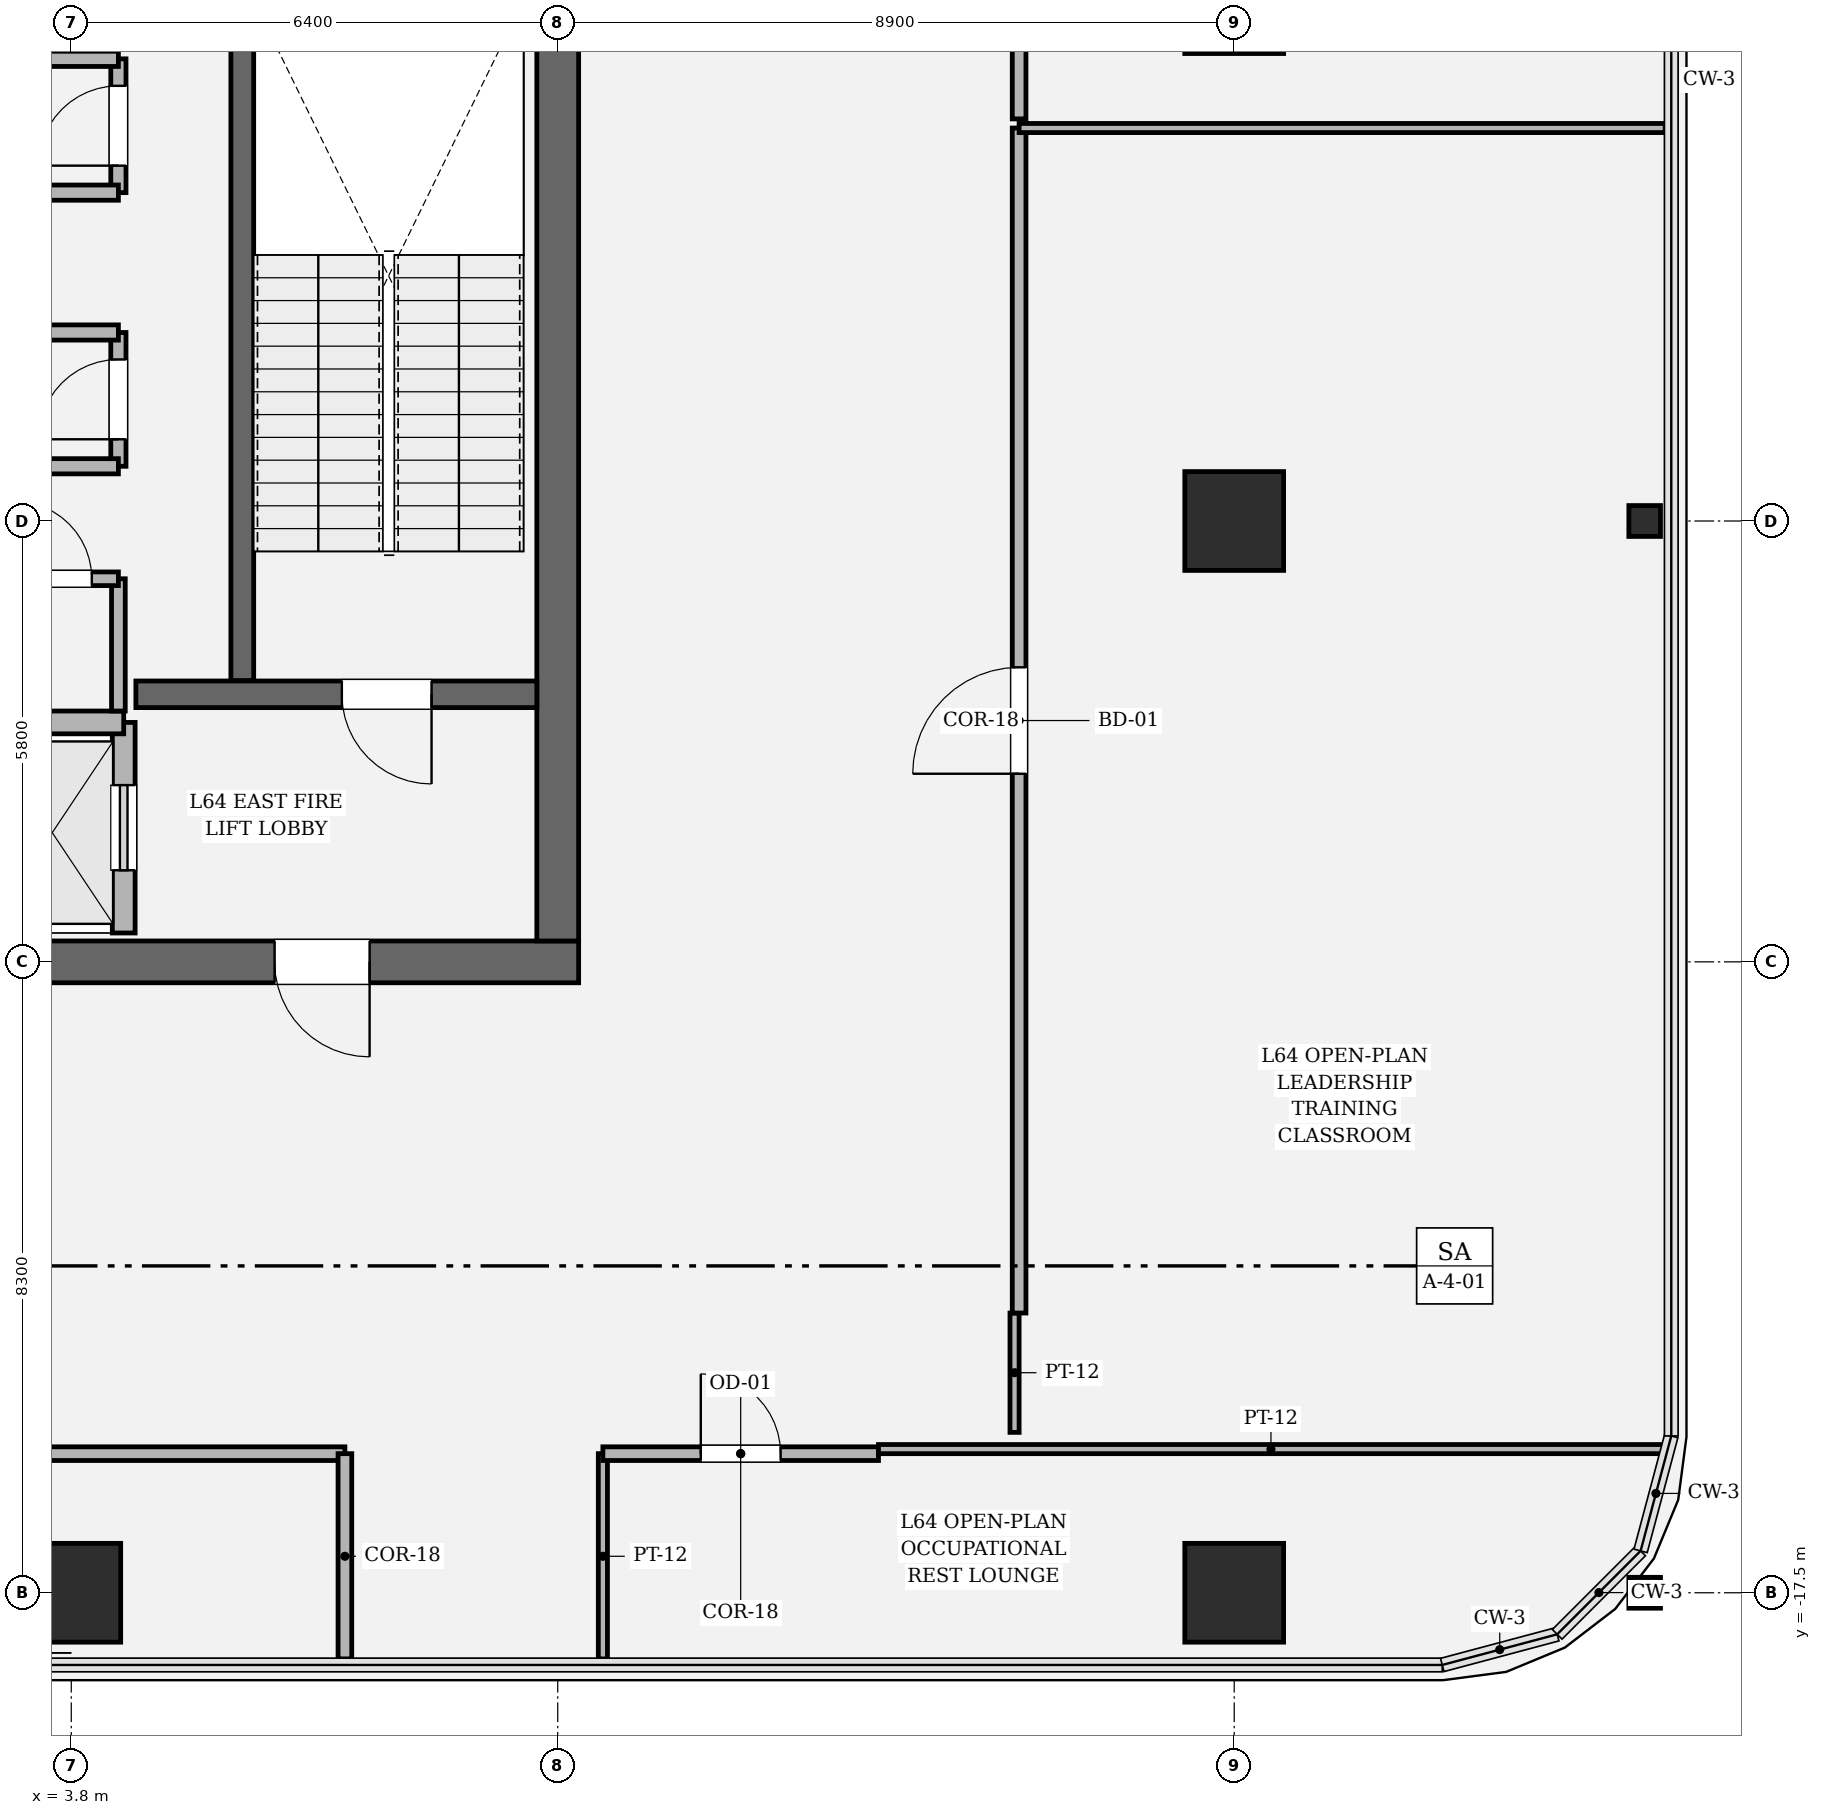
"""IFC4 building model, lengths in metres.
Left out: names, types, materials, properties, quantities, classifications, styles, units other than length and angle.
Written with IfcOpenShell. Run it as: python <this file> out.ifc"""

import sys

from ifc_helpers import new_model, si_unit, direction, frame, frame_2d, origin, origin_2d, place, context, subcontext, project, spatial, rectangle, hollow_rectangle, i_section, extrude, element, fill, save


model = new_model("IFC4")
c1 = context("Model", 3, precision=1e-05, world=origin(), true_north=direction((0.0, 1.0)))
c2 = subcontext(c1, "Body", "Model", "MODEL_VIEW")
j1 = project(units=[si_unit("LENGTHUNIT", "METRE"), si_unit("PLANEANGLEUNIT", "RADIAN")], contexts=[c1])
p1 = place(None, origin())
s1 = spatial("IfcSite", under=j1, at=p1, CompositionType="ELEMENT")
p2 = place(p1, origin())
s2 = spatial("IfcBuilding", under=s1, at=p2, CompositionType="ELEMENT")
p3 = place(p2, frame((0.0, 0.0, 271.65)))
s3 = spatial("IfcBuildingStorey", under=s2, at=p3, CompositionType="ELEMENT", Elevation=271.65)
p4 = place(p3, frame((10.475, -9.2, 0.0), z_axis=(0.0, 0.0, 1.0), x_axis=(-1.0, 0.0, 0.0)))
e1 = element("IfcWall", 1, at=p4, inside=s3, PredefinedType="SHEAR", context=c2, shape_type="SweptSolid", body=[
    extrude(rectangle(XDim=20.95, YDim=0.55, at=frame_2d((10.475, 0.0))), origin(), (0.0, 0.0, 1.0), 4.05),
])
p5 = place(p4, frame((2.75, 0.0, 0.0)))
e2 = element("IfcOpeningElement", 2, at=p5, cuts=e1, PredefinedType="OPENING", context=c2, shape_type="SweptSolid", body=[
    extrude(rectangle(XDim=1.25, YDim=2.25, at=frame_2d((0.625, 1.125))), frame((0.0, 0.285, 0.0), z_axis=(0.0, -1.0, 0.0), x_axis=(1.0, 0.0, 0.0)), (0.0, 0.0, 1.0), 0.57),
])
p6 = place(p4, frame((16.95, 0.0, 0.0)))
e3 = element("IfcOpeningElement", 3, at=p6, cuts=e1, PredefinedType="OPENING", context=c2, shape_type="SweptSolid", body=[
    extrude(rectangle(XDim=1.25, YDim=2.25, at=frame_2d((0.625, 1.125))), frame((0.0, 0.285, 0.0), z_axis=(0.0, -1.0, 0.0), x_axis=(1.0, 0.0, 0.0)), (0.0, 0.0, 1.0), 0.57),
])
p7 = place(p3, frame((10.2, 8.925, 0.0), z_axis=(0.0, 0.0, 1.0), x_axis=(0.0, -1.0, 0.0)))
e4 = element("IfcWall", 4, at=p7, inside=s3, PredefinedType="SHEAR", context=c2, shape_type="SweptSolid", body=[
    extrude(rectangle(XDim=17.85, YDim=0.55, at=frame_2d((8.925, 0.0))), origin(), (0.0, 0.0, 1.0), 4.05),
])
p8 = place(p7, frame((3.955, 0.0, 0.0)))
e5 = element("IfcOpeningElement", 5, at=p8, cuts=e4, PredefinedType="OPENING", context=c2, shape_type="SweptSolid", body=[
    extrude(rectangle(XDim=1.18, YDim=2.2, at=frame_2d((0.59, 1.1))), frame((0.0, 0.285, 0.0), z_axis=(0.0, -1.0, 0.0), x_axis=(1.0, 0.0, 0.0)), (0.0, 0.0, 1.0), 0.57),
])
p9 = place(p3, frame((6.05, 3.45, 0.0), z_axis=(0.0, 0.0, 1.0), x_axis=(0.0, -1.0, 0.0)))
e6 = element("IfcWall", 6, at=p9, inside=s3, PredefinedType="SOLIDWALL", context=c2, shape_type="SweptSolid", body=[
    extrude(rectangle(XDim=8.95, YDim=0.3, at=frame_2d((4.475, 0.0))), origin(), (0.0, 0.0, 1.0), 4.05),
])
p10 = place(p3, frame((4.65, -5.68, 0.0), z_axis=(0.0, 0.0, 1.0), x_axis=(1.0, 0.0, 0.0)))
e7 = element("IfcWall", 7, at=p10, inside=s3, PredefinedType="SOLIDWALL", context=c2, shape_type="SweptSolid", body=[
    extrude(rectangle(XDim=5.275, YDim=0.35, at=frame_2d((2.638, 0.0))), origin(), (0.0, 0.0, 1.0), 4.05),
])
p11 = place(p10, frame((2.71, 0.0, 0.0)))
e8 = element("IfcOpeningElement", 8, at=p11, cuts=e7, PredefinedType="OPENING", context=c2, shape_type="SweptSolid", body=[
    extrude(rectangle(XDim=1.18, YDim=2.2, at=frame_2d((0.59, 1.1))), frame((0.0, 0.185, 0.0), z_axis=(0.0, -1.0, 0.0), x_axis=(1.0, 0.0, 0.0)), (0.0, 0.0, 1.0), 0.37),
])
for number, where, z_axis, x_axis in (
    (9, (3.8, -17.5, 0.0), (0.0, 0.0, 1.0), (1.0, 0.0, 0.0)),
    (10, (19.1, -17.5, 0.0), (0.0, 0.0, 1.0), (1.0, 0.0, 0.0)),
    (11, (19.1, -3.4, 0.0), (0.0, 0.0, 1.0), (1.0, 0.0, 0.0)),
    (12, (19.1, 3.4, 0.0), (0.0, 0.0, 1.0), (1.0, 0.0, 0.0)),
):
    element("IfcColumn", number, at=place(p3, frame(where, z_axis=z_axis, x_axis=x_axis)), inside=s3, PredefinedType="COLUMN", context=c2, shape_type="SweptSolid", body=[
        extrude(hollow_rectangle(XDim=1.3, YDim=1.3, WallThickness=0.038, at=origin_2d()), origin(), (0.0, 0.0, 1.0), 4.05),
    ])
for number, where, z_axis, x_axis in (
    (13, (24.5, -17.5, 0.0), (0.0, 0.0, 1.0), (0.0, 1.0, 0.0)),
    (14, (24.5, -3.4, 0.0), (0.0, 0.0, 1.0), (0.0, 1.0, 0.0)),
):
    element("IfcColumn", number, at=place(p3, frame(where, z_axis=z_axis, x_axis=x_axis)), inside=s3, PredefinedType="COLUMN", context=c2, shape_type="SweptSolid", body=[
        extrude(i_section(OverallWidth=0.406, OverallDepth=0.416, WebThickness=0.029, FlangeThickness=0.048, FilletRadius=0.018, at=origin_2d()), origin(), (0.0, 0.0, 1.0), 4.048),
    ])
p12 = place(p3, frame((4.49, -8.82, 0.0), z_axis=(0.0, 0.0, 1.0), x_axis=(0.0, 1.0, 0.0)))
e15 = element("IfcWall", 15, at=p12, inside=s3, PredefinedType="SOLIDWALL", context=c2, shape_type="SweptSolid", body=[
    extrude(rectangle(XDim=2.77, YDim=0.3, at=frame_2d((1.385, 0.0))), origin(), (0.0, 0.0, 1.0), 3.85),
])
p13 = place(p12, frame((0.825, 0.0, 0.0)))
e16 = element("IfcOpeningElement", 16, at=p13, cuts=e15, PredefinedType="OPENING", context=c2, shape_type="SweptSolid", body=[
    extrude(rectangle(XDim=1.12, YDim=2.25, at=frame_2d((0.56, 1.125))), frame((0.0, 0.16, 0.0), z_axis=(0.0, -1.0, 0.0), x_axis=(1.0, 0.0, 0.0)), (0.0, 0.0, 1.0), 0.32),
])
p14 = place(p3, frame((2.61, -6.05, 0.0), z_axis=(0.0, 0.0, 1.0), x_axis=(1.0, 0.0, 0.0)))
e17 = element("IfcWall", 17, at=p14, inside=s3, PredefinedType="SOLIDWALL", context=c2, shape_type="SweptSolid", body=[
    extrude(rectangle(XDim=1.88, YDim=0.3, at=frame_2d((0.94, 0.0))), origin(), (0.0, 0.0, 1.0), 3.85),
])
p15 = place(p3, frame((4.42, -5.9, 0.0), z_axis=(0.0, 0.0, 1.0), x_axis=(0.0, 1.0, 0.0)))
e18 = element("IfcWall", 18, at=p15, inside=s3, PredefinedType="PARTITIONING", context=c2, shape_type="SweptSolid", body=[
    extrude(rectangle(XDim=1.74, YDim=0.18, at=frame_2d((0.87, 0.0))), origin(), (0.0, 0.0, 1.0), 3.85),
])
p16 = place(p3, frame((4.42, -4.16, 0.0), z_axis=(0.0, 0.0, 1.0), x_axis=(-1.0, 0.0, 0.0)))
e19 = element("IfcWall", 19, at=p16, inside=s3, PredefinedType="PARTITIONING", context=c2, shape_type="SweptSolid", body=[
    extrude(rectangle(XDim=1.72, YDim=0.18, at=frame_2d((0.86, 0.0))), origin(), (0.0, 0.0, 1.0), 3.85),
])
p17 = place(p16, frame((0.35, 0.0, 0.0)))
e20 = element("IfcOpeningElement", 20, at=p17, cuts=e19, PredefinedType="OPENING", context=c2, shape_type="SweptSolid", body=[
    extrude(rectangle(XDim=1.02, YDim=2.2, at=frame_2d((0.51, 1.1))), frame((0.0, 0.1, 0.0), z_axis=(0.0, -1.0, 0.0), x_axis=(1.0, 0.0, 0.0)), (0.0, 0.0, 1.0), 0.2),
])
p18 = place(p3, frame((4.42, -2.68, 0.0), z_axis=(0.0, 0.0, 1.0), x_axis=(0.0, 1.0, 0.0)))
e21 = element("IfcWall", 21, at=p18, inside=s3, PredefinedType="SOLIDWALL", context=c2, shape_type="SweptSolid", body=[
    extrude(rectangle(XDim=1.76, YDim=0.2, at=frame_2d((0.88, 0.0))), origin(), (0.0, 0.0, 1.0), 3.85),
])
p19 = place(p18, frame((0.355, 0.0, 0.0)))
e22 = element("IfcOpeningElement", 22, at=p19, cuts=e21, PredefinedType="OPENING", context=c2, shape_type="SweptSolid", body=[
    extrude(rectangle(XDim=1.05, YDim=2.2, at=frame_2d((0.525, 1.1))), frame((0.0, 0.11, 0.0), z_axis=(0.0, -1.0, 0.0), x_axis=(1.0, 0.0, 0.0)), (0.0, 0.0, 1.0), 0.22),
])
for number, where, z_axis, x_axis in (
    (23, (4.42, -0.92, 0.0), (0.0, 0.0, 1.0), (-1.0, 0.0, 0.0)),
    (24, (2.48, -2.68, 0.0), (0.0, 0.0, 1.0), (1.0, 0.0, 0.0)),
):
    element("IfcWall", number, at=place(p3, frame(where, z_axis=z_axis, x_axis=x_axis)), inside=s3, PredefinedType="SOLIDWALL", context=c2, shape_type="SweptSolid", body=[
        extrude(rectangle(XDim=1.94, YDim=0.2, at=frame_2d((0.97, 0.0))), origin(), (0.0, 0.0, 1.0), 3.85),
    ])
p20 = place(p3, frame((4.42, 0.92, 0.0), z_axis=(0.0, 0.0, 1.0), x_axis=(0.0, 1.0, 0.0)))
e25 = element("IfcWall", 25, at=p20, inside=s3, PredefinedType="SOLIDWALL", context=c2, shape_type="SweptSolid", body=[
    extrude(rectangle(XDim=1.76, YDim=0.2, at=frame_2d((0.88, 0.0))), origin(), (0.0, 0.0, 1.0), 3.85),
])
p21 = place(p20, frame((0.355, 0.0, 0.0)))
e26 = element("IfcOpeningElement", 26, at=p21, cuts=e25, PredefinedType="OPENING", context=c2, shape_type="SweptSolid", body=[
    extrude(rectangle(XDim=1.05, YDim=2.2, at=frame_2d((0.525, 1.1))), frame((0.0, 0.11, 0.0), z_axis=(0.0, -1.0, 0.0), x_axis=(1.0, 0.0, 0.0)), (0.0, 0.0, 1.0), 0.22),
])
for number, where, z_axis, x_axis in (
    (27, (4.42, 2.68, 0.0), (0.0, 0.0, 1.0), (-1.0, 0.0, 0.0)),
    (28, (2.5, 0.92, 0.0), (0.0, 0.0, 1.0), (1.0, 0.0, 0.0)),
):
    element("IfcWall", number, at=place(p3, frame(where, z_axis=z_axis, x_axis=x_axis)), inside=s3, PredefinedType="SOLIDWALL", context=c2, shape_type="SweptSolid", body=[
        extrude(rectangle(XDim=1.92, YDim=0.2, at=frame_2d((0.96, 0.0))), origin(), (0.0, 0.0, 1.0), 3.85),
    ])
p22 = place(p3, frame((-12.77, -15.67, 0.0), z_axis=(0.0, 0.0, 1.0), x_axis=(1.0, 0.0, 0.0)))
e29 = element("IfcWall", 29, at=p22, inside=s3, PredefinedType="PARTITIONING", context=c2, shape_type="SweptSolid", body=[
    extrude(rectangle(XDim=20.17, YDim=0.18, at=frame_2d((10.085, 0.0))), origin(), (0.0, 0.0, 1.0), 3.244),
])
p23 = place(p22, frame((10.01, 0.0, 0.0)))
e30 = element("IfcOpeningElement", 30, at=p23, cuts=e29, PredefinedType="OPENING", context=c2, shape_type="SweptSolid", body=[
    extrude(rectangle(XDim=1.05, YDim=2.2, at=frame_2d((0.525, 1.1))), frame((0.0, 0.1, 0.0), z_axis=(0.0, -1.0, 0.0), x_axis=(1.0, 0.0, 0.0)), (0.0, 0.0, 1.0), 0.2),
])
p24 = place(p3, frame((7.4, -15.67, 0.0), z_axis=(0.0, 0.0, 1.0), x_axis=(0.0, -1.0, 0.0)))
e31 = element("IfcWall", 31, at=p24, inside=s3, PredefinedType="PARTITIONING", context=c2, shape_type="SweptSolid", body=[
    extrude(rectangle(XDim=2.7, YDim=0.18, at=frame_2d((1.35, 0.0))), origin(), (0.0, 0.0, 1.0), 3.244),
])
p25 = place(p3, frame((10.794, -18.37, 0.0), z_axis=(0.0, 0.0, 1.0), x_axis=(0.0, 1.0, 0.0)))
e32 = element("IfcWall", 32, at=p25, inside=s3, PredefinedType="PARTITIONING", context=c2, shape_type="SweptSolid", body=[
    extrude(rectangle(XDim=2.7, YDim=0.12, at=frame_2d((1.35, 0.0))), origin(), (0.0, 0.0, 1.0), 3.244),
])
p26 = place(p3, frame((10.794, -15.67, 0.0), z_axis=(0.0, 0.0, 1.0), x_axis=(1.0, 0.0, 0.0)))
e33 = element("IfcWall", 33, at=p26, inside=s3, PredefinedType="PARTITIONING", context=c2, shape_type="SweptSolid", body=[
    extrude(rectangle(XDim=3.626, YDim=0.18, at=frame_2d((1.813, 0.0))), origin(), (0.0, 0.0, 1.0), 3.85),
])
p27 = place(p26, frame((1.288, 0.0, 0.0)))
e34 = element("IfcOpeningElement", 34, at=p27, cuts=e33, PredefinedType="OPENING", context=c2, shape_type="SweptSolid", body=[
    extrude(rectangle(XDim=1.05, YDim=2.2, at=frame_2d((0.525, 1.1))), frame((0.0, 0.1, 0.0), z_axis=(0.0, -1.0, 0.0), x_axis=(1.0, 0.0, 0.0)), (0.0, 0.0, 1.0), 0.2),
])
p28 = place(p3, frame((14.42, -15.61, 0.0), z_axis=(0.0, 0.0, 1.0), x_axis=(1.0, 0.0, 0.0)))
e35 = element("IfcWall", 35, at=p28, inside=s3, PredefinedType="PARTITIONING", context=c2, shape_type="SweptSolid", body=[
    extrude(rectangle(XDim=10.327, YDim=0.12, at=frame_2d((5.163, 0.0))), origin(), (0.0, 0.0, 1.0), 2.564),
])
p29 = place(p3, frame((16.21, -15.39, 0.0), z_axis=(0.0, 0.0, 1.0), x_axis=(0.0, 1.0, 0.0)))
e36 = element("IfcWall", 36, at=p29, inside=s3, PredefinedType="PARTITIONING", context=c2, shape_type="SweptSolid", body=[
    extrude(rectangle(XDim=1.57, YDim=0.12, at=frame_2d((0.785, 0.0))), origin(), (0.0, 0.0, 1.0), 3.85),
])
p30 = place(p3, frame((16.27, -13.82, 0.0), z_axis=(0.0, 0.0, 1.0), x_axis=(0.0, 1.0, 0.0)))
e37 = element("IfcWall", 37, at=p30, inside=s3, PredefinedType="PARTITIONING", context=c2, shape_type="SweptSolid", body=[
    extrude(rectangle(XDim=15.59, YDim=0.18, at=frame_2d((7.795, 0.0))), origin(), (0.0, 0.0, 1.0), 3.244),
])
p31 = place(p30, frame((7.095, 0.0, 0.0)))
e38 = element("IfcOpeningElement", 38, at=p31, cuts=e37, PredefinedType="OPENING", context=c2, shape_type="SweptSolid", body=[
    extrude(rectangle(XDim=1.4, YDim=2.25, at=frame_2d((0.7, 1.125))), frame((0.0, 0.1, 0.0), z_axis=(0.0, -1.0, 0.0), x_axis=(1.0, 0.0, 0.0)), (0.0, 0.0, 1.0), 0.2),
])
p32 = place(p3, frame((16.27, 1.77, 0.0), z_axis=(0.0, 0.0, 1.0), x_axis=(1.0, 0.0, 0.0)))
e39 = element("IfcWall", 39, at=p32, inside=s3, PredefinedType="PARTITIONING", context=c2, shape_type="SweptSolid", body=[
    extrude(rectangle(XDim=8.5, YDim=0.12, at=frame_2d((4.25, 0.0))), origin(), (0.0, 0.0, 1.0), 2.564),
])
p33 = place(p3, frame((16.27, 1.89, 0.0), z_axis=(0.0, 0.0, 1.0), x_axis=(0.0, 1.0, 0.0)))
e40 = element("IfcWall", 40, at=p33, inside=s3, PredefinedType="PARTITIONING", context=c2, shape_type="SweptSolid", body=[
    extrude(rectangle(XDim=9.6, YDim=0.18, at=frame_2d((4.8, 0.0))), origin(), (0.0, 0.0, 1.0), 3.244),
])
p34 = place(p33, frame((4.275, 0.0, 0.0)))
e41 = element("IfcOpeningElement", 41, at=p34, cuts=e40, PredefinedType="OPENING", context=c2, shape_type="SweptSolid", body=[
    extrude(rectangle(XDim=1.05, YDim=2.2, at=frame_2d((0.525, 1.1))), frame((0.0, 0.1, 0.0), z_axis=(0.0, -1.0, 0.0), x_axis=(1.0, 0.0, 0.0)), (0.0, 0.0, 1.0), 0.2),
])
p35 = place(p11, origin())
e42 = element("IfcDoor", 42, at=p35, inside=s3, OperationType="SINGLE_SWING_RIGHT", PredefinedType="DOOR", context=c2, shape_type="SweptSolid", body=[
    extrude(rectangle(XDim=1.18, YDim=2.2, at=frame_2d((0.59, 1.1))), frame((0.0, 0.025, 0.0), z_axis=(0.0, -1.0, 0.0), x_axis=(1.0, 0.0, 0.0)), (0.0, 0.0, 1.0), 0.05),
])
fill(e8, e42)
p36 = place(p5, origin())
e43 = element("IfcDoor", 43, at=p36, inside=s3, OperationType="SINGLE_SWING_LEFT", PredefinedType="DOOR", context=c2, shape_type="SweptSolid", body=[
    extrude(rectangle(XDim=1.25, YDim=2.25, at=frame_2d((0.625, 1.125))), frame((0.0, 0.025, 0.0), z_axis=(0.0, -1.0, 0.0), x_axis=(1.0, 0.0, 0.0)), (0.0, 0.0, 1.0), 0.05),
])
fill(e2, e43)
p37 = place(p13, origin())
e44 = element("IfcDoor", 44, at=p37, inside=s3, OperationType="SLIDING_TO_RIGHT", PredefinedType="DOOR", context=c2, shape_type="SweptSolid", body=[
    extrude(rectangle(XDim=1.12, YDim=2.25, at=frame_2d((0.56, 1.125))), frame((0.0, 0.025, 0.0), z_axis=(0.0, -1.0, 0.0), x_axis=(1.0, 0.0, 0.0)), (0.0, 0.0, 1.0), 0.05),
])
fill(e16, e44)
p38 = place(p17, origin())
e45 = element("IfcDoor", 45, at=p38, inside=s3, OperationType="SINGLE_SWING_RIGHT", PredefinedType="DOOR", context=c2, shape_type="SweptSolid", body=[
    extrude(rectangle(XDim=1.02, YDim=2.2, at=frame_2d((0.51, 1.1))), frame((0.0, 0.025, 0.0), z_axis=(0.0, -1.0, 0.0), x_axis=(1.0, 0.0, 0.0)), (0.0, 0.0, 1.0), 0.05),
])
fill(e20, e45)
p39 = place(p19, origin())
e46 = element("IfcDoor", 46, at=p39, inside=s3, OperationType="SINGLE_SWING_LEFT", PredefinedType="DOOR", context=c2, shape_type="SweptSolid", body=[
    extrude(rectangle(XDim=1.05, YDim=2.2, at=frame_2d((0.525, 1.1))), frame((0.0, 0.025, 0.0), z_axis=(0.0, -1.0, 0.0), x_axis=(1.0, 0.0, 0.0)), (0.0, 0.0, 1.0), 0.05),
])
fill(e22, e46)
p40 = place(p21, origin())
e47 = element("IfcDoor", 47, at=p40, inside=s3, OperationType="SINGLE_SWING_LEFT", PredefinedType="DOOR", context=c2, shape_type="SweptSolid", body=[
    extrude(rectangle(XDim=1.05, YDim=2.2, at=frame_2d((0.525, 1.1))), frame((0.0, 0.025, 0.0), z_axis=(0.0, -1.0, 0.0), x_axis=(1.0, 0.0, 0.0)), (0.0, 0.0, 1.0), 0.05),
])
fill(e26, e47)
p41 = place(p27, origin())
e48 = element("IfcDoor", 48, at=p41, inside=s3, OperationType="SINGLE_SWING_LEFT", PredefinedType="DOOR", context=c2, shape_type="SweptSolid", body=[
    extrude(rectangle(XDim=1.05, YDim=2.2, at=frame_2d((0.525, 1.1))), frame((0.0, 0.025, 0.0), z_axis=(0.0, -1.0, 0.0), x_axis=(1.0, 0.0, 0.0)), (0.0, 0.0, 1.0), 0.05),
])
fill(e34, e48)
p42 = place(p31, origin())
e49 = element("IfcDoor", 49, at=p42, inside=s3, OperationType="SINGLE_SWING_LEFT", PredefinedType="DOOR", context=c2, shape_type="SweptSolid", body=[
    extrude(rectangle(XDim=1.4, YDim=2.25, at=frame_2d((0.7, 1.125))), frame((0.0, 0.025, 0.0), z_axis=(0.0, -1.0, 0.0), x_axis=(1.0, 0.0, 0.0)), (0.0, 0.0, 1.0), 0.05),
])
fill(e38, e49)
save(model, sys.argv[1])
